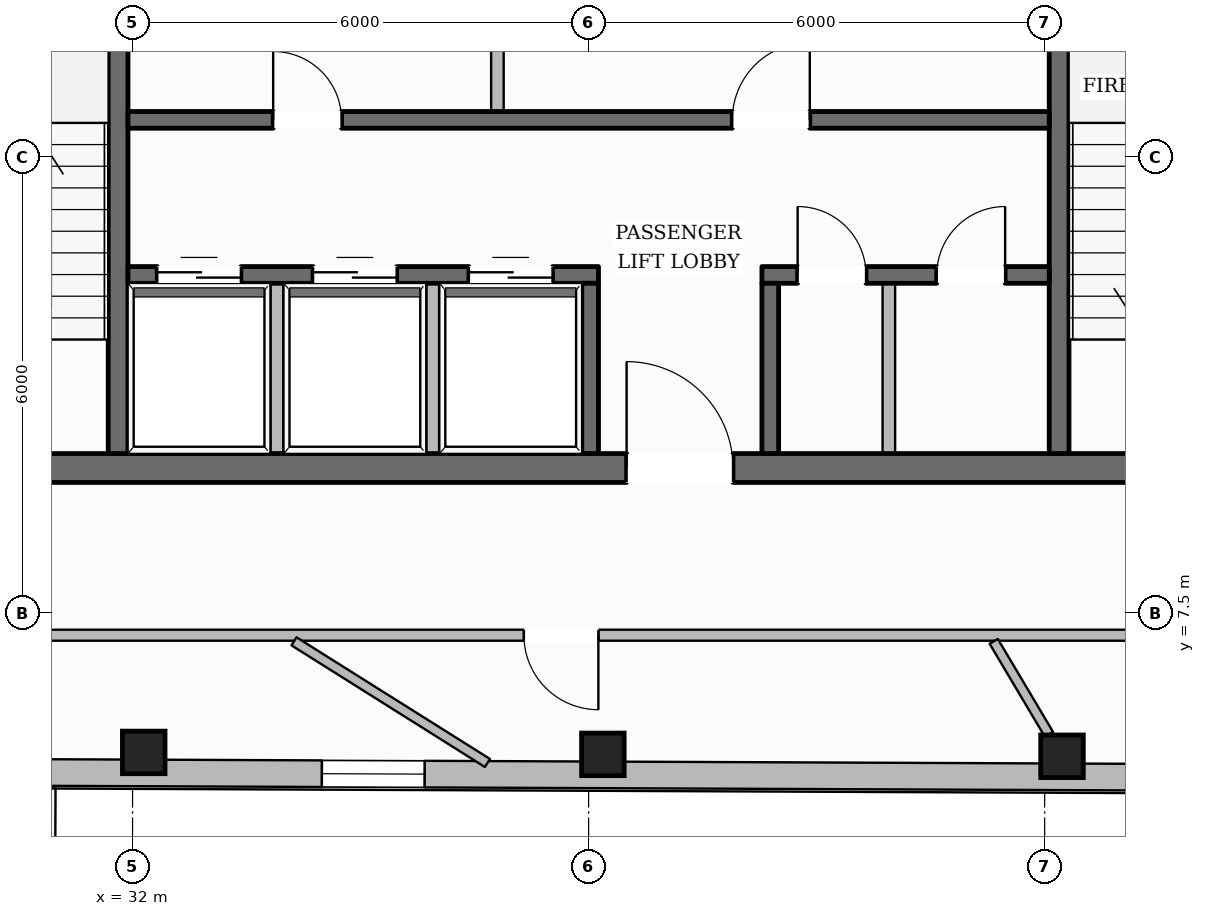
"""IFC4 building model, lengths in metres.
Left out: names, types, materials, properties, quantities, classifications, styles, units other than length and angle.
Written with IfcOpenShell. Run it as: python <this file> out.ifc"""

import sys

from ifc_helpers import new_model, si_unit, direction, frame, frame_2d, origin, origin_2d, place, context, subcontext, project, spatial, rectangle, hollow_rectangle, extrude, element, fill, save


model = new_model("IFC4")
c1 = context("Model", 3, precision=1e-05, world=origin(), true_north=direction((0.0, 1.0)))
c2 = subcontext(c1, "Body", "Model", "MODEL_VIEW")
j1 = project(units=[si_unit("LENGTHUNIT", "METRE"), si_unit("PLANEANGLEUNIT", "RADIAN")], contexts=[c1])
p1 = place(None, origin())
s1 = spatial("IfcSite", under=j1, at=p1, CompositionType="ELEMENT")
p2 = place(p1, origin())
s2 = spatial("IfcBuilding", under=s1, at=p2, CompositionType="ELEMENT")
p3 = place(p2, frame((0.0, 0.0, 239.5)))
s3 = spatial("IfcBuildingStorey", under=s2, at=p3, CompositionType="ELEMENT", Elevation=239.5)
p4 = place(p3, frame((28.1, 9.41, 0.0), z_axis=(0.0, 0.0, 1.0), x_axis=(1.0, 0.0, 0.0)))
e1 = element("IfcWall", 1, at=p4, inside=s3, PredefinedType="SOLIDWALL", context=c2, shape_type="SweptSolid", body=[
    extrude(rectangle(XDim=19.8, YDim=0.38, at=frame_2d((9.9, 0.0))), origin(), (0.0, 0.0, 1.0), 3.61),
])
p5 = place(p4, frame((10.4, 0.0, 0.0)))
e2 = element("IfcOpeningElement", 2, at=p5, cuts=e1, PredefinedType="OPENING", context=c2, shape_type="SweptSolid", body=[
    extrude(rectangle(XDim=1.4, YDim=2.2, at=frame_2d((0.7, 1.1))), frame((0.0, 0.2, 0.0), z_axis=(0.0, -1.0, 0.0), x_axis=(1.0, 0.0, 0.0)), (0.0, 0.0, 1.0), 0.4),
])
p6 = place(p3, frame((31.81, 9.6, 0.0), z_axis=(0.0, 0.0, 1.0), x_axis=(0.0, 1.0, 0.0)))
e3 = element("IfcWall", 3, at=p6, inside=s3, PredefinedType="SHEAR", context=c2, shape_type="SweptSolid", body=[
    extrude(rectangle(XDim=13.0, YDim=0.26, at=frame_2d((6.5, 0.0))), origin(), (0.0, 0.0, 1.0), 3.61),
])
p7 = place(p6, frame((10.925, 0.0, 0.0)))
e4 = element("IfcOpeningElement", 4, at=p7, cuts=e3, PredefinedType="OPENING", context=c2, shape_type="SweptSolid", body=[
    extrude(rectangle(XDim=1.25, YDim=2.25, at=frame_2d((0.625, 1.125))), frame((0.0, 0.14, 0.0), z_axis=(0.0, -1.0, 0.0), x_axis=(1.0, 0.0, 0.0)), (0.0, 0.0, 1.0), 0.28),
])
p8 = place(p3, frame((44.19, 9.6, 0.0), z_axis=(0.0, 0.0, 1.0), x_axis=(0.0, 1.0, 0.0)))
e5 = element("IfcWall", 5, at=p8, inside=s3, PredefinedType="SHEAR", context=c2, shape_type="SweptSolid", body=[
    extrude(rectangle(XDim=13.0, YDim=0.26, at=frame_2d((6.5, 0.0))), origin(), (0.0, 0.0, 1.0), 3.61),
])
p9 = place(p8, frame((10.925, 0.0, 0.0)))
e6 = element("IfcOpeningElement", 6, at=p9, cuts=e5, PredefinedType="OPENING", context=c2, shape_type="SweptSolid", body=[
    extrude(rectangle(XDim=1.25, YDim=2.25, at=frame_2d((0.625, 1.125))), frame((0.0, 0.14, 0.0), z_axis=(0.0, -1.0, 0.0), x_axis=(1.0, 0.0, 0.0)), (0.0, 0.0, 1.0), 0.28),
])
p10 = place(p3, frame((31.94, 13.99, 0.0), z_axis=(0.0, 0.0, 1.0), x_axis=(1.0, 0.0, 0.0)))
e7 = element("IfcWall", 7, at=p10, inside=s3, PredefinedType="SOLIDWALL", context=c2, shape_type="SweptSolid", body=[
    extrude(rectangle(XDim=12.12, YDim=0.22, at=frame_2d((6.06, 0.0))), origin(), (0.0, 0.0, 1.0), 3.61),
])
p11 = place(p10, frame((1.91, 0.0, 0.0)))
e8 = element("IfcOpeningElement", 8, at=p11, cuts=e7, PredefinedType="OPENING", context=c2, shape_type="SweptSolid", body=[
    extrude(rectangle(XDim=0.9, YDim=2.1, at=frame_2d((0.45, 1.05))), frame((0.0, 0.12, 0.0), z_axis=(0.0, -1.0, 0.0), x_axis=(1.0, 0.0, 0.0)), (0.0, 0.0, 1.0), 0.24),
])
p12 = place(p10, frame((7.95, 0.0, 0.0)))
e9 = element("IfcOpeningElement", 9, at=p12, cuts=e7, PredefinedType="OPENING", context=c2, shape_type="SweptSolid", body=[
    extrude(rectangle(XDim=1.02, YDim=2.15, at=frame_2d((0.51, 1.075))), frame((0.0, 0.12, 0.0), z_axis=(0.0, -1.0, 0.0), x_axis=(1.0, 0.0, 0.0)), (0.0, 0.0, 1.0), 0.24),
])
p13 = place(p3, frame((31.94, 11.95, 0.0), z_axis=(0.0, 0.0, 1.0), x_axis=(1.0, 0.0, 0.0)))
e10 = element("IfcWall", 10, at=p13, inside=s3, PredefinedType="SOLIDWALL", context=c2, shape_type="SweptSolid", body=[
    extrude(rectangle(XDim=6.19, YDim=0.22, at=frame_2d((3.095, 0.0))), origin(), (0.0, 0.0, 1.0), 3.61),
])
p14 = place(p13, frame((0.385, 0.0, 0.0)))
e11 = element("IfcOpeningElement", 11, at=p14, cuts=e10, PredefinedType="OPENING", context=c2, shape_type="SweptSolid", body=[
    extrude(rectangle(XDim=1.1, YDim=2.2, at=frame_2d((0.55, 1.1))), frame((0.0, 0.12, 0.0), z_axis=(0.0, -1.0, 0.0), x_axis=(1.0, 0.0, 0.0)), (0.0, 0.0, 1.0), 0.24),
])
p15 = place(p13, frame((2.435, 0.0, 0.0)))
e12 = element("IfcOpeningElement", 12, at=p15, cuts=e10, PredefinedType="OPENING", context=c2, shape_type="SweptSolid", body=[
    extrude(rectangle(XDim=1.1, YDim=2.2, at=frame_2d((0.55, 1.1))), frame((0.0, 0.12, 0.0), z_axis=(0.0, -1.0, 0.0), x_axis=(1.0, 0.0, 0.0)), (0.0, 0.0, 1.0), 0.24),
])
p16 = place(p13, frame((4.485, 0.0, 0.0)))
e13 = element("IfcOpeningElement", 13, at=p16, cuts=e10, PredefinedType="OPENING", context=c2, shape_type="SweptSolid", body=[
    extrude(rectangle(XDim=1.1, YDim=2.2, at=frame_2d((0.55, 1.1))), frame((0.0, 0.12, 0.0), z_axis=(0.0, -1.0, 0.0), x_axis=(1.0, 0.0, 0.0)), (0.0, 0.0, 1.0), 0.24),
])
p17 = place(p3, frame((40.28, 11.95, 0.0), z_axis=(0.0, 0.0, 1.0), x_axis=(1.0, 0.0, 0.0)))
e14 = element("IfcWall", 14, at=p17, inside=s3, PredefinedType="SOLIDWALL", context=c2, shape_type="SweptSolid", body=[
    extrude(rectangle(XDim=3.78, YDim=0.22, at=frame_2d((1.89, 0.0))), origin(), (0.0, 0.0, 1.0), 3.61),
])
p18 = place(p17, frame((0.47, 0.0, 0.0)))
e15 = element("IfcOpeningElement", 15, at=p18, cuts=e14, PredefinedType="OPENING", context=c2, shape_type="SweptSolid", body=[
    extrude(rectangle(XDim=0.9, YDim=2.1, at=frame_2d((0.45, 1.05))), frame((0.0, 0.12, 0.0), z_axis=(0.0, -1.0, 0.0), x_axis=(1.0, 0.0, 0.0)), (0.0, 0.0, 1.0), 0.24),
])
p19 = place(p17, frame((2.3, 0.0, 0.0)))
e16 = element("IfcOpeningElement", 16, at=p19, cuts=e14, PredefinedType="OPENING", context=c2, shape_type="SweptSolid", body=[
    extrude(rectangle(XDim=0.9, YDim=2.1, at=frame_2d((0.45, 1.05))), frame((0.0, 0.12, 0.0), z_axis=(0.0, -1.0, 0.0), x_axis=(1.0, 0.0, 0.0)), (0.0, 0.0, 1.0), 0.24),
])
for number, where, z_axis, x_axis in (
    (17, (38.02, 9.6, 0.0), (0.0, 0.0, 1.0), (0.0, 1.0, 0.0)),
    (18, (40.39, 9.6, 0.0), (0.0, 0.0, 1.0), (0.0, 1.0, 0.0)),
):
    element("IfcWall", number, at=place(p3, frame(where, z_axis=z_axis, x_axis=x_axis)), inside=s3, PredefinedType="SOLIDWALL", context=c2, shape_type="SweptSolid", body=[
        extrude(rectangle(XDim=2.24, YDim=0.22, at=frame_2d((1.12, 0.0))), origin(), (0.0, 0.0, 1.0), 3.61),
    ])
for number, where, z_axis, x_axis in (
    (19, (32.147, 5.668, 0.0), (0.0, 0.0, 1.0), (1.0, 0.0, 0.0)),
    (20, (38.188, 5.643, 0.0), (0.0, 0.0, 1.0), (1.0, 0.0, 0.0)),
    (21, (44.228, 5.617, 0.0), (0.0, 0.0, 1.0), (1.0, 0.0, 0.0)),
):
    element("IfcColumn", number, at=place(p3, frame(where, z_axis=z_axis, x_axis=x_axis)), inside=s3, PredefinedType="COLUMN", context=c2, shape_type="SweptSolid", body=[
        extrude(hollow_rectangle(XDim=0.56, YDim=0.56, WallThickness=0.025, at=origin_2d()), origin(), (0.0, 0.0, 1.0), 3.61),
    ])
p20 = place(p3, frame((16.196, 11.427, 0.0), z_axis=(0.0, 0.0, 1.0), x_axis=(0.490622807514, 0.871372056442, 0.0)))
e22 = element("IfcWall", 22, at=p20, inside=s3, PredefinedType="STANDARD", context=c2, shape_type="SweptSolid", body=[
    extrude(rectangle(XDim=37.632, YDim=0.35, at=frame_2d((18.816, 0.0))), origin(), (0.0, 0.0, 1.0), 3.196),
])
p21 = place(p20, frame((27.624, 0.0, 0.0)))
e23 = element("IfcOpeningElement", 23, at=p21, cuts=e22, PredefinedType="OPENING", context=c2, shape_type="SweptSolid", body=[
    extrude(rectangle(XDim=1.0, YDim=2.2, at=frame_2d((0.5, 1.1))), frame((0.0, 0.185, 0.0), z_axis=(0.0, -1.0, 0.0), x_axis=(1.0, 0.0, 0.0)), (0.0, 0.0, 1.0), 0.37),
])
p22 = place(p20, frame((33.418, 0.0, 0.65)))
e24 = element("IfcOpeningElement", 24, at=p22, cuts=e22, PredefinedType="OPENING", context=c2, shape_type="SweptSolid", body=[
    extrude(rectangle(XDim=1.35, YDim=1.75, at=frame_2d((0.675, 0.875))), frame((0.0, 0.185, 0.0), z_axis=(0.0, -1.0, 0.0), x_axis=(1.0, 0.0, 0.0)), (0.0, 0.0, 1.0), 0.37),
])
p23 = place(p20, frame((21.192, 0.0, 0.65)))
e25 = element("IfcOpeningElement", 25, at=p23, cuts=e22, PredefinedType="OPENING", context=c2, shape_type="SweptSolid", body=[
    extrude(rectangle(XDim=1.35, YDim=1.75, at=frame_2d((0.675, 0.875))), frame((0.0, 0.185, 0.0), z_axis=(0.0, -1.0, 0.0), x_axis=(1.0, 0.0, 0.0)), (0.0, 0.0, 1.0), 0.37),
])
p24 = place(p20, frame((8.966, 0.0, 0.65)))
e26 = element("IfcOpeningElement", 26, at=p24, cuts=e22, PredefinedType="OPENING", context=c2, shape_type="SweptSolid", body=[
    extrude(rectangle(XDim=1.35, YDim=1.75, at=frame_2d((0.675, 0.875))), frame((0.0, 0.185, 0.0), z_axis=(0.0, -1.0, 0.0), x_axis=(1.0, 0.0, 0.0)), (0.0, 0.0, 1.0), 0.37),
])
p25 = place(p20, frame((2.853, 0.0, 0.65)))
e27 = element("IfcOpeningElement", 27, at=p25, cuts=e22, PredefinedType="OPENING", context=c2, shape_type="SweptSolid", body=[
    extrude(rectangle(XDim=1.35, YDim=1.75, at=frame_2d((0.675, 0.875))), frame((0.0, 0.185, 0.0), z_axis=(0.0, -1.0, 0.0), x_axis=(1.0, 0.0, 0.0)), (0.0, 0.0, 1.0), 0.37),
])
p26 = place(p3, frame((56.79, 5.294, 0.0), z_axis=(0.0, 0.0, 1.0), x_axis=(-0.999991124913, 0.004213086292, 0.0)))
e28 = element("IfcWall", 28, at=p26, inside=s3, PredefinedType="STANDARD", context=c2, shape_type="SweptSolid", body=[
    extrude(rectangle(XDim=37.203, YDim=0.35, at=frame_2d((18.601, 0.0))), origin(), (0.0, 0.0, 1.0), 3.196),
])
p27 = place(p26, frame((27.302, 0.0, 0.0)))
e29 = element("IfcOpeningElement", 29, at=p27, cuts=e28, PredefinedType="OPENING", context=c2, shape_type="SweptSolid", body=[
    extrude(rectangle(XDim=1.0, YDim=2.2, at=frame_2d((0.5, 1.1))), frame((0.0, 0.185, 0.0), z_axis=(0.0, -1.0, 0.0), x_axis=(1.0, 0.0, 0.0)), (0.0, 0.0, 1.0), 0.37),
])
p28 = place(p26, frame((33.03, 0.0, 0.65)))
e30 = element("IfcOpeningElement", 30, at=p28, cuts=e28, PredefinedType="OPENING", context=c2, shape_type="SweptSolid", body=[
    extrude(rectangle(XDim=1.35, YDim=1.75, at=frame_2d((0.675, 0.875))), frame((0.0, 0.185, 0.0), z_axis=(0.0, -1.0, 0.0), x_axis=(1.0, 0.0, 0.0)), (0.0, 0.0, 1.0), 0.37),
])
p29 = place(p26, frame((20.948, 0.0, 0.65)))
e31 = element("IfcOpeningElement", 31, at=p29, cuts=e28, PredefinedType="OPENING", context=c2, shape_type="SweptSolid", body=[
    extrude(rectangle(XDim=1.35, YDim=1.75, at=frame_2d((0.675, 0.875))), frame((0.0, 0.185, 0.0), z_axis=(0.0, -1.0, 0.0), x_axis=(1.0, 0.0, 0.0)), (0.0, 0.0, 1.0), 0.37),
])
p30 = place(p26, frame((8.868, 0.0, 0.65)))
e32 = element("IfcOpeningElement", 32, at=p30, cuts=e28, PredefinedType="OPENING", context=c2, shape_type="SweptSolid", body=[
    extrude(rectangle(XDim=1.35, YDim=1.75, at=frame_2d((0.675, 0.875))), frame((0.0, 0.185, 0.0), z_axis=(0.0, -1.0, 0.0), x_axis=(1.0, 0.0, 0.0)), (0.0, 0.0, 1.0), 0.37),
])
p31 = place(p26, frame((2.827, 0.0, 0.65)))
e33 = element("IfcOpeningElement", 33, at=p31, cuts=e28, PredefinedType="OPENING", context=c2, shape_type="SweptSolid", body=[
    extrude(rectangle(XDim=1.35, YDim=1.75, at=frame_2d((0.675, 0.875))), frame((0.0, 0.185, 0.0), z_axis=(0.0, -1.0, 0.0), x_axis=(1.0, 0.0, 0.0)), (0.0, 0.0, 1.0), 0.37),
])
p32 = place(p3, frame((41.394, 44.187, 0.0), z_axis=(0.0, 0.0, 1.0), x_axis=(0.494287620829, -0.869298422807, 0.0)))
e34 = element("IfcWall", 34, at=p32, inside=s3, PredefinedType="STANDARD", context=c2, shape_type="SweptSolid", body=[
    extrude(rectangle(XDim=37.899, YDim=0.35, at=frame_2d((18.95, 0.0))), origin(), (0.0, 0.0, 1.0), 3.196),
])
p33 = place(p32, frame((33.674, 0.0, 0.65)))
e35 = element("IfcOpeningElement", 35, at=p33, cuts=e34, PredefinedType="OPENING", context=c2, shape_type="SweptSolid", body=[
    extrude(rectangle(XDim=1.35, YDim=1.75, at=frame_2d((0.675, 0.875))), frame((0.0, 0.185, 0.0), z_axis=(0.0, -1.0, 0.0), x_axis=(1.0, 0.0, 0.0)), (0.0, 0.0, 1.0), 0.37),
])
p34 = place(p32, frame((27.515, 0.0, 0.65)))
e36 = element("IfcOpeningElement", 36, at=p34, cuts=e34, PredefinedType="OPENING", context=c2, shape_type="SweptSolid", body=[
    extrude(rectangle(XDim=1.35, YDim=1.75, at=frame_2d((0.675, 0.875))), frame((0.0, 0.185, 0.0), z_axis=(0.0, -1.0, 0.0), x_axis=(1.0, 0.0, 0.0)), (0.0, 0.0, 1.0), 0.37),
])
p35 = place(p32, frame((21.357, 0.0, 0.65)))
e37 = element("IfcOpeningElement", 37, at=p35, cuts=e34, PredefinedType="OPENING", context=c2, shape_type="SweptSolid", body=[
    extrude(rectangle(XDim=1.35, YDim=1.75, at=frame_2d((0.675, 0.875))), frame((0.0, 0.185, 0.0), z_axis=(0.0, -1.0, 0.0), x_axis=(1.0, 0.0, 0.0)), (0.0, 0.0, 1.0), 0.37),
])
p36 = place(p32, frame((9.04, 0.0, 0.65)))
e38 = element("IfcOpeningElement", 38, at=p36, cuts=e34, PredefinedType="OPENING", context=c2, shape_type="SweptSolid", body=[
    extrude(rectangle(XDim=1.35, YDim=1.75, at=frame_2d((0.675, 0.875))), frame((0.0, 0.185, 0.0), z_axis=(0.0, -1.0, 0.0), x_axis=(1.0, 0.0, 0.0)), (0.0, 0.0, 1.0), 0.37),
])
p37 = place(p32, frame((2.882, 0.0, 0.65)))
e39 = element("IfcOpeningElement", 39, at=p37, cuts=e34, PredefinedType="OPENING", context=c2, shape_type="SweptSolid", body=[
    extrude(rectangle(XDim=1.35, YDim=1.75, at=frame_2d((0.675, 0.875))), frame((0.0, 0.185, 0.0), z_axis=(0.0, -1.0, 0.0), x_axis=(1.0, 0.0, 0.0)), (0.0, 0.0, 1.0), 0.37),
])
for number, where, z_axis, x_axis in (
    (40, (33.9, 9.49, 0.0), (0.0, 0.0, 1.0), (0.0, 1.0, 0.0)),
    (41, (35.95, 9.49, 0.0), (0.0, 0.0, 1.0), (0.0, 1.0, 0.0)),
):
    element("IfcWall", number, at=place(p3, frame(where, z_axis=z_axis, x_axis=x_axis)), inside=s3, PredefinedType="PARTITIONING", context=c2, shape_type="SweptSolid", body=[
        extrude(rectangle(XDim=2.35, YDim=0.165, at=frame_2d((1.175, 0.0))), origin(), (0.0, 0.0, 1.0), 3.61),
    ])
p38 = place(p3, frame((36.8, 14.1, 0.0), z_axis=(0.0, 0.0, 1.0), x_axis=(0.0, 1.0, 0.0)))
e42 = element("IfcWall", 42, at=p38, inside=s3, PredefinedType="PARTITIONING", context=c2, shape_type="SweptSolid", body=[
    extrude(rectangle(XDim=2.24, YDim=0.165, at=frame_2d((1.12, 0.0))), origin(), (0.0, 0.0, 1.0), 3.61),
])
p39 = place(p3, frame((41.95, 9.49, 0.0), z_axis=(0.0, 0.0, 1.0), x_axis=(0.0, 1.0, 0.0)))
e43 = element("IfcWall", 43, at=p39, inside=s3, PredefinedType="PARTITIONING", context=c2, shape_type="SweptSolid", body=[
    extrude(rectangle(XDim=2.35, YDim=0.165, at=frame_2d((1.175, 0.0))), origin(), (0.0, 0.0, 1.0), 3.61),
])
p40 = place(p3, frame((49.91, 7.21, 0.0), z_axis=(0.0, 0.0, 1.0), x_axis=(-1.0, 0.0, 0.0)))
e44 = element("IfcWall", 44, at=p40, inside=s3, PredefinedType="PARTITIONING", context=c2, shape_type="SweptSolid", body=[
    extrude(rectangle(XDim=23.82, YDim=0.145, at=frame_2d((11.91, 0.0))), origin(), (0.0, 0.0, 1.0), 3.61),
])
p41 = place(p40, frame((11.781, 0.0, 0.0)))
e45 = element("IfcOpeningElement", 45, at=p41, cuts=e44, PredefinedType="OPENING", context=c2, shape_type="SweptSolid", body=[
    extrude(rectangle(XDim=0.98, YDim=2.15, at=frame_2d((0.49, 1.075))), frame((0.0, 0.083, 0.0), z_axis=(0.0, -1.0, 0.0), x_axis=(1.0, 0.0, 0.0)), (0.0, 0.0, 1.0), 0.165),
])
p42 = place(p40, frame((19.288, 0.0, 0.0)))
e46 = element("IfcOpeningElement", 46, at=p42, cuts=e44, PredefinedType="OPENING", context=c2, shape_type="SweptSolid", body=[
    extrude(rectangle(XDim=0.98, YDim=2.15, at=frame_2d((0.49, 1.075))), frame((0.0, 0.083, 0.0), z_axis=(0.0, -1.0, 0.0), x_axis=(1.0, 0.0, 0.0)), (0.0, 0.0, 1.0), 0.165),
])
p43 = place(p40, frame((2.473, 0.0, 0.0)))
e47 = element("IfcOpeningElement", 47, at=p43, cuts=e44, PredefinedType="OPENING", context=c2, shape_type="SweptSolid", body=[
    extrude(rectangle(XDim=1.4, YDim=2.2, at=frame_2d((0.7, 1.1))), frame((0.0, 0.083, 0.0), z_axis=(0.0, -1.0, 0.0), x_axis=(1.0, 0.0, 0.0)), (0.0, 0.0, 1.0), 0.165),
])
p44 = place(p3, frame((43.33, 7.129, 0.0), z_axis=(0.0, 0.0, 1.0), x_axis=(0.510784350638, -0.859708873481, 0.0)))
e48 = element("IfcWall", 48, at=p44, inside=s3, PredefinedType="PARTITIONING", context=c2, shape_type="SweptSolid", body=[
    extrude(rectangle(XDim=1.424, YDim=0.125, at=frame_2d((0.712, 0.0))), origin(), (0.0, 0.0, 1.0), 3.61),
])
p45 = place(p3, frame((34.125, 7.129, 0.0), z_axis=(0.0, 0.0, 1.0), x_axis=(0.846525696198, -0.532347861531, 0.0)))
e49 = element("IfcWall", 49, at=p45, inside=s3, PredefinedType="PARTITIONING", context=c2, shape_type="SweptSolid", body=[
    extrude(rectangle(XDim=3.006, YDim=0.125, at=frame_2d((1.503, 0.0))), origin(), (0.0, 0.0, 1.0), 3.61),
])
p46 = place(p29, origin())
e50 = element("IfcWindow", 50, at=p46, inside=s3, PartitioningType="SINGLE_PANEL", PredefinedType="WINDOW", context=c2, shape_type="SweptSolid", body=[
    extrude(rectangle(XDim=1.35, YDim=1.75, at=frame_2d((0.675, 0.875))), frame((0.0, 0.03, 0.0), z_axis=(0.0, -1.0, 0.0), x_axis=(1.0, 0.0, 0.0)), (0.0, 0.0, 1.0), 0.06),
])
fill(e31, e50)
p47 = place(p5, origin())
e51 = element("IfcDoor", 51, at=p47, inside=s3, OperationType="SINGLE_SWING_LEFT", PredefinedType="DOOR", context=c2, shape_type="SweptSolid", body=[
    extrude(rectangle(XDim=1.4, YDim=2.2, at=frame_2d((0.7, 1.1))), frame((0.0, 0.025, 0.0), z_axis=(0.0, -1.0, 0.0), x_axis=(1.0, 0.0, 0.0)), (0.0, 0.0, 1.0), 0.05),
])
fill(e2, e51)
p48 = place(p14, origin())
e52 = element("IfcDoor", 52, at=p48, inside=s3, OperationType="DOUBLE_DOOR_SLIDING", PredefinedType="DOOR", context=c2, shape_type="SweptSolid", body=[
    extrude(rectangle(XDim=1.1, YDim=2.2, at=frame_2d((0.55, 1.1))), frame((0.0, 0.025, 0.0), z_axis=(0.0, -1.0, 0.0), x_axis=(1.0, 0.0, 0.0)), (0.0, 0.0, 1.0), 0.05),
])
fill(e11, e52)
p49 = place(p15, origin())
e53 = element("IfcDoor", 53, at=p49, inside=s3, OperationType="DOUBLE_DOOR_SLIDING", PredefinedType="DOOR", context=c2, shape_type="SweptSolid", body=[
    extrude(rectangle(XDim=1.1, YDim=2.2, at=frame_2d((0.55, 1.1))), frame((0.0, 0.025, 0.0), z_axis=(0.0, -1.0, 0.0), x_axis=(1.0, 0.0, 0.0)), (0.0, 0.0, 1.0), 0.05),
])
fill(e12, e53)
p50 = place(p16, origin())
e54 = element("IfcDoor", 54, at=p50, inside=s3, OperationType="DOUBLE_DOOR_SLIDING", PredefinedType="DOOR", context=c2, shape_type="SweptSolid", body=[
    extrude(rectangle(XDim=1.1, YDim=2.2, at=frame_2d((0.55, 1.1))), frame((0.0, 0.025, 0.0), z_axis=(0.0, -1.0, 0.0), x_axis=(1.0, 0.0, 0.0)), (0.0, 0.0, 1.0), 0.05),
])
fill(e13, e54)
p51 = place(p11, origin())
e55 = element("IfcDoor", 55, at=p51, inside=s3, OperationType="SINGLE_SWING_LEFT", PredefinedType="DOOR", context=c2, shape_type="SweptSolid", body=[
    extrude(rectangle(XDim=0.9, YDim=2.1, at=frame_2d((0.45, 1.05))), frame((0.0, 0.025, 0.0), z_axis=(0.0, -1.0, 0.0), x_axis=(1.0, 0.0, 0.0)), (0.0, 0.0, 1.0), 0.05),
])
fill(e8, e55)
p52 = place(p12, origin())
e56 = element("IfcDoor", 56, at=p52, inside=s3, OperationType="SINGLE_SWING_RIGHT", PredefinedType="DOOR", context=c2, shape_type="SweptSolid", body=[
    extrude(rectangle(XDim=1.02, YDim=2.15, at=frame_2d((0.51, 1.075))), frame((0.0, 0.025, 0.0), z_axis=(0.0, -1.0, 0.0), x_axis=(1.0, 0.0, 0.0)), (0.0, 0.0, 1.0), 0.05),
])
fill(e9, e56)
p53 = place(p18, origin())
e57 = element("IfcDoor", 57, at=p53, inside=s3, OperationType="SINGLE_SWING_LEFT", PredefinedType="DOOR", context=c2, shape_type="SweptSolid", body=[
    extrude(rectangle(XDim=0.9, YDim=2.1, at=frame_2d((0.45, 1.05))), frame((0.0, 0.025, 0.0), z_axis=(0.0, -1.0, 0.0), x_axis=(1.0, 0.0, 0.0)), (0.0, 0.0, 1.0), 0.05),
])
fill(e15, e57)
p54 = place(p19, origin())
e58 = element("IfcDoor", 58, at=p54, inside=s3, OperationType="SINGLE_SWING_RIGHT", PredefinedType="DOOR", context=c2, shape_type="SweptSolid", body=[
    extrude(rectangle(XDim=0.9, YDim=2.1, at=frame_2d((0.45, 1.05))), frame((0.0, 0.025, 0.0), z_axis=(0.0, -1.0, 0.0), x_axis=(1.0, 0.0, 0.0)), (0.0, 0.0, 1.0), 0.05),
])
fill(e16, e58)
p55 = place(p41, origin())
e59 = element("IfcDoor", 59, at=p55, inside=s3, OperationType="SINGLE_SWING_LEFT", PredefinedType="DOOR", context=c2, shape_type="SweptSolid", body=[
    extrude(rectangle(XDim=0.98, YDim=2.15, at=frame_2d((0.49, 1.075))), frame((0.0, 0.025, 0.0), z_axis=(0.0, -1.0, 0.0), x_axis=(1.0, 0.0, 0.0)), (0.0, 0.0, 1.0), 0.05),
])
fill(e45, e59)
save(model, sys.argv[1])
